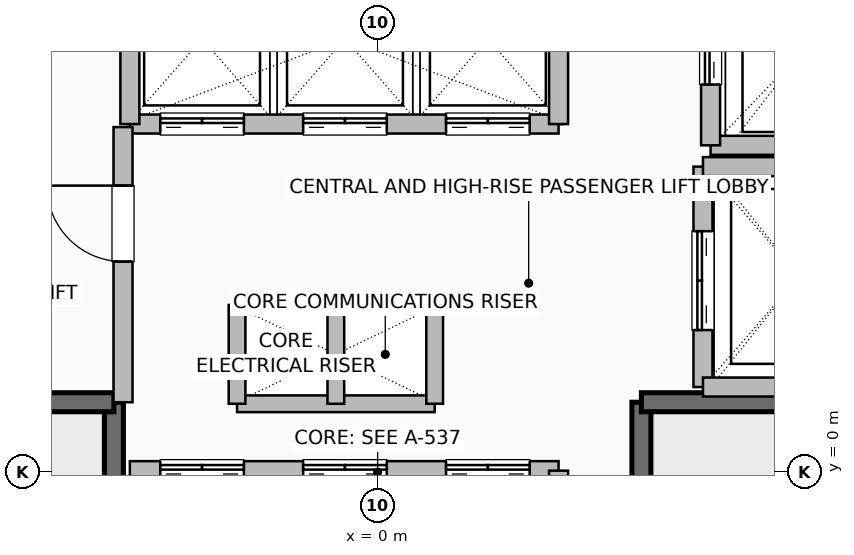
"""IFC4 building model, lengths in metres.
Left out: names, types, materials, properties, quantities, classifications, styles, units other than length and angle.
Written with IfcOpenShell. Run it as: python <this file> out.ifc"""

import sys

from ifc_helpers import new_model, si_unit, direction, frame, frame_2d, origin, place, context, subcontext, project, spatial, rectangle, extrude, element, fill, save


model = new_model("IFC4")
c1 = context("Model", 3, precision=1e-05, world=origin(), true_north=direction((0.0, 1.0)))
c2 = subcontext(c1, "Body", "Model", "MODEL_VIEW")
j1 = project(units=[si_unit("LENGTHUNIT", "METRE"), si_unit("PLANEANGLEUNIT", "RADIAN")], contexts=[c1])
p1 = place(None, origin())
s1 = spatial("IfcSite", under=j1, at=p1, CompositionType="ELEMENT")
p2 = place(p1, origin())
s2 = spatial("IfcBuilding", under=s1, at=p2, CompositionType="ELEMENT")
p3 = place(p2, frame((0.0, 0.0, 140.8)))
s3 = spatial("IfcBuildingStorey", under=s2, at=p3, CompositionType="ELEMENT", Elevation=140.8)
p4 = place(p3, frame((-3.47, -6.8, 0.0), z_axis=(0.0, 0.0, 1.0), x_axis=(0.0, 1.0, 0.0)))
e1 = element("IfcWall", 1, at=p4, inside=s3, PredefinedType="SHEAR", context=c2, shape_type="SweptSolid", body=[
    extrude(rectangle(XDim=7.72, YDim=0.25, at=frame_2d((3.86, 0.0))), origin(), (0.0, 0.0, 1.0), 3.36),
])
p5 = place(p3, frame((-6.8, 0.92, 0.0), z_axis=(0.0, 0.0, 1.0), x_axis=(1.0, 0.0, 0.0)))
e2 = element("IfcWall", 2, at=p5, inside=s3, PredefinedType="SHEAR", context=c2, shape_type="SweptSolid", body=[
    extrude(rectangle(XDim=3.33, YDim=0.25, at=frame_2d((1.665, 0.0))), origin(), (0.0, 0.0, 1.0), 3.36),
])
p6 = place(p3, frame((3.47, -6.8, 0.0), z_axis=(0.0, 0.0, 1.0), x_axis=(0.0, 1.0, 0.0)))
e3 = element("IfcWall", 3, at=p6, inside=s3, PredefinedType="SHEAR", context=c2, shape_type="SweptSolid", body=[
    extrude(rectangle(XDim=7.72, YDim=0.25, at=frame_2d((3.86, 0.0))), origin(), (0.0, 0.0, 1.0), 3.36),
])
p7 = place(p3, frame((3.47, 0.92, 0.0), z_axis=(0.0, 0.0, 1.0), x_axis=(1.0, 0.0, 0.0)))
e4 = element("IfcWall", 4, at=p7, inside=s3, PredefinedType="SHEAR", context=c2, shape_type="SweptSolid", body=[
    extrude(rectangle(XDim=3.33, YDim=0.25, at=frame_2d((1.665, 0.0))), origin(), (0.0, 0.0, 1.0), 3.36),
])
for number, where, z_axis, x_axis in (
    (5, (-1.85, 2.2, 0.0), (0.0, 0.0, 1.0), (1.0, 0.0, 0.0)),
    (6, (-1.85, 0.9, 0.0), (0.0, 0.0, 1.0), (1.0, 0.0, 0.0)),
):
    element("IfcWall", number, at=place(p3, frame(where, z_axis=z_axis, x_axis=x_axis)), inside=s3, PredefinedType="PARTITIONING", context=c2, shape_type="SweptSolid", body=[
        extrude(rectangle(XDim=2.6, YDim=0.22, at=frame_2d((1.3, 0.0))), origin(), (0.0, 0.0, 1.0), 3.36),
    ])
for number, where, z_axis, x_axis in (
    (7, (-0.55, 0.9, 0.0), (0.0, 0.0, 1.0), (0.0, 1.0, 0.0)),
    (8, (0.75, 0.9, 0.0), (0.0, 0.0, 1.0), (0.0, 1.0, 0.0)),
    (9, (-1.85, 0.9, 0.0), (0.0, 0.0, 1.0), (0.0, 1.0, 0.0)),
):
    element("IfcWall", number, at=place(p3, frame(where, z_axis=z_axis, x_axis=x_axis)), inside=s3, PredefinedType="PARTITIONING", context=c2, shape_type="SweptSolid", body=[
        extrude(rectangle(XDim=1.3, YDim=0.22, at=frame_2d((0.65, 0.0))), origin(), (0.0, 0.0, 1.0), 3.36),
    ])
p8 = place(p3, frame((-3.26, 0.02, 0.0), z_axis=(0.0, 0.0, 1.0), x_axis=(1.0, 0.0, 0.0)))
e10 = element("IfcWall", 10, at=p8, inside=s3, PredefinedType="SHEAR", context=c2, shape_type="SweptSolid", body=[
    extrude(rectangle(XDim=5.64, YDim=0.25, at=frame_2d((2.82, 0.0))), origin(), (0.0, 0.0, 1.0), 3.36),
])
p9 = place(p8, frame((0.4, 0.0, 0.0)))
e11 = element("IfcOpeningElement", 11, at=p9, cuts=e10, PredefinedType="OPENING", context=c2, shape_type="SweptSolid", body=[
    extrude(rectangle(XDim=1.1, YDim=2.2, at=frame_2d((0.55, 1.1))), frame((0.0, 0.135, 0.0), z_axis=(0.0, -1.0, 0.0), x_axis=(1.0, 0.0, 0.0)), (0.0, 0.0, 1.0), 0.27),
])
p10 = place(p8, frame((2.28, 0.0, 0.0)))
e12 = element("IfcOpeningElement", 12, at=p10, cuts=e10, PredefinedType="OPENING", context=c2, shape_type="SweptSolid", body=[
    extrude(rectangle(XDim=1.1, YDim=2.2, at=frame_2d((0.55, 1.1))), frame((0.0, 0.135, 0.0), z_axis=(0.0, -1.0, 0.0), x_axis=(1.0, 0.0, 0.0)), (0.0, 0.0, 1.0), 0.27),
])
p11 = place(p8, frame((4.16, 0.0, 0.0)))
e13 = element("IfcOpeningElement", 13, at=p11, cuts=e10, PredefinedType="OPENING", context=c2, shape_type="SweptSolid", body=[
    extrude(rectangle(XDim=1.1, YDim=2.2, at=frame_2d((0.55, 1.1))), frame((0.0, 0.135, 0.0), z_axis=(0.0, -1.0, 0.0), x_axis=(1.0, 0.0, 0.0)), (0.0, 0.0, 1.0), 0.27),
])
p12 = place(p3, frame((2.38, -2.42, 0.0), z_axis=(0.0, 0.0, 1.0), x_axis=(0.0, 1.0, 0.0)))
e14 = element("IfcWall", 14, at=p12, inside=s3, PredefinedType="SHEAR", context=c2, shape_type="SweptSolid", body=[
    extrude(rectangle(XDim=2.44, YDim=0.25, at=frame_2d((1.22, 0.0))), origin(), (0.0, 0.0, 1.0), 3.36),
])
p13 = place(p3, frame((-3.26, 4.58, 0.0), z_axis=(0.0, 0.0, 1.0), x_axis=(1.0, 0.0, 0.0)))
e15 = element("IfcWall", 15, at=p13, inside=s3, PredefinedType="SHEAR", context=c2, shape_type="SweptSolid", body=[
    extrude(rectangle(XDim=5.64, YDim=0.25, at=frame_2d((2.82, 0.0))), origin(), (0.0, 0.0, 1.0), 3.36),
])
p14 = place(p13, frame((0.4, 0.0, 0.0)))
e16 = element("IfcOpeningElement", 16, at=p14, cuts=e15, PredefinedType="OPENING", context=c2, shape_type="SweptSolid", body=[
    extrude(rectangle(XDim=1.1, YDim=2.2, at=frame_2d((0.55, 1.1))), frame((0.0, 0.135, 0.0), z_axis=(0.0, -1.0, 0.0), x_axis=(1.0, 0.0, 0.0)), (0.0, 0.0, 1.0), 0.27),
])
p15 = place(p13, frame((2.28, 0.0, 0.0)))
e17 = element("IfcOpeningElement", 17, at=p15, cuts=e15, PredefinedType="OPENING", context=c2, shape_type="SweptSolid", body=[
    extrude(rectangle(XDim=1.1, YDim=2.2, at=frame_2d((0.55, 1.1))), frame((0.0, 0.135, 0.0), z_axis=(0.0, -1.0, 0.0), x_axis=(1.0, 0.0, 0.0)), (0.0, 0.0, 1.0), 0.27),
])
p16 = place(p13, frame((4.16, 0.0, 0.0)))
e18 = element("IfcOpeningElement", 18, at=p16, cuts=e15, PredefinedType="OPENING", context=c2, shape_type="SweptSolid", body=[
    extrude(rectangle(XDim=1.1, YDim=2.2, at=frame_2d((0.55, 1.1))), frame((0.0, 0.135, 0.0), z_axis=(0.0, -1.0, 0.0), x_axis=(1.0, 0.0, 0.0)), (0.0, 0.0, 1.0), 0.27),
])
for number, where, z_axis, x_axis in (
    (19, (-3.26, 4.58, 0.0), (0.0, 0.0, 1.0), (0.0, 1.0, 0.0)),
    (20, (2.38, 4.58, 0.0), (0.0, 0.0, 1.0), (0.0, 1.0, 0.0)),
):
    element("IfcWall", number, at=place(p3, frame(where, z_axis=z_axis, x_axis=x_axis)), inside=s3, PredefinedType="SHEAR", context=c2, shape_type="SweptSolid", body=[
        extrude(rectangle(XDim=2.22, YDim=0.25, at=frame_2d((1.11, 0.0))), origin(), (0.0, 0.0, 1.0), 3.36),
    ])
p17 = place(p3, frame((4.38, 4.3, 0.0), z_axis=(0.0, 0.0, 1.0), x_axis=(1.0, 0.0, 0.0)))
e21 = element("IfcWall", 21, at=p17, inside=s3, PredefinedType="SHEAR", context=c2, shape_type="SweptSolid", body=[
    extrude(rectangle(XDim=2.42, YDim=0.25, at=frame_2d((1.21, 0.0))), origin(), (0.0, 0.0, 1.0), 3.36),
])
p18 = place(p3, frame((4.38, 4.3, 0.0), z_axis=(0.0, 0.0, 1.0), x_axis=(0.0, 1.0, 0.0)))
e22 = element("IfcWall", 22, at=p18, inside=s3, PredefinedType="SHEAR", context=c2, shape_type="SweptSolid", body=[
    extrude(rectangle(XDim=2.5, YDim=0.25, at=frame_2d((1.25, 0.0))), origin(), (0.0, 0.0, 1.0), 3.36),
])
p19 = place(p18, frame((0.8, 0.0, 0.0)))
e23 = element("IfcOpeningElement", 23, at=p19, cuts=e22, PredefinedType="OPENING", context=c2, shape_type="SweptSolid", body=[
    extrude(rectangle(XDim=1.2, YDim=2.2, at=frame_2d((0.6, 1.1))), frame((0.0, 0.135, 0.0), z_axis=(0.0, -1.0, 0.0), x_axis=(1.0, 0.0, 0.0)), (0.0, 0.0, 1.0), 0.27),
])
p20 = place(p3, frame((4.28, 1.12, 0.0), z_axis=(0.0, 0.0, 1.0), x_axis=(0.0, 1.0, 0.0)))
e24 = element("IfcWall", 24, at=p20, inside=s3, PredefinedType="SHEAR", context=c2, shape_type="SweptSolid", body=[
    extrude(rectangle(XDim=2.9, YDim=0.25, at=frame_2d((1.45, 0.0))), origin(), (0.0, 0.0, 1.0), 3.36),
])
p21 = place(p20, frame((0.75, 0.0, 0.0)))
e25 = element("IfcOpeningElement", 25, at=p21, cuts=e24, PredefinedType="OPENING", context=c2, shape_type="SweptSolid", body=[
    extrude(rectangle(XDim=1.3, YDim=2.3, at=frame_2d((0.65, 1.15))), frame((0.0, 0.135, 0.0), z_axis=(0.0, -1.0, 0.0), x_axis=(1.0, 0.0, 0.0)), (0.0, 0.0, 1.0), 0.27),
])
for number, where, z_axis, x_axis in (
    (26, (4.28, 1.12, 0.0), (0.0, 0.0, 1.0), (1.0, 0.0, 0.0)),
    (27, (4.28, 4.02, 0.0), (0.0, 0.0, 1.0), (1.0, 0.0, 0.0)),
):
    element("IfcWall", number, at=place(p3, frame(where, z_axis=z_axis, x_axis=x_axis)), inside=s3, PredefinedType="SHEAR", context=c2, shape_type="SweptSolid", body=[
        extrude(rectangle(XDim=2.52, YDim=0.25, at=frame_2d((1.26, 0.0))), origin(), (0.0, 0.0, 1.0), 3.36),
    ])
p22 = place(p3, frame((-3.35, 0.92, 0.0), z_axis=(0.0, 0.0, 1.0), x_axis=(0.0, 1.0, 0.0)))
e28 = element("IfcWall", 28, at=p22, inside=s3, PredefinedType="SHEAR", context=c2, shape_type="SweptSolid", body=[
    extrude(rectangle(XDim=3.62, YDim=0.25, at=frame_2d((1.81, 0.0))), origin(), (0.0, 0.0, 1.0), 3.36),
])
p23 = place(p22, frame((1.85, 0.0, 0.0)))
e29 = element("IfcOpeningElement", 29, at=p23, cuts=e28, PredefinedType="OPENING", context=c2, shape_type="SweptSolid", body=[
    extrude(rectangle(XDim=1.0, YDim=2.08, at=frame_2d((0.5, 1.04))), frame((0.0, 0.135, 0.0), z_axis=(0.0, -1.0, 0.0), x_axis=(1.0, 0.0, 0.0)), (0.0, 0.0, 1.0), 0.27),
])
p24 = place(p9, origin())
e30 = element("IfcDoor", 30, at=p24, inside=s3, OperationType="DOUBLE_DOOR_SLIDING", PredefinedType="DOOR", context=c2, shape_type="SweptSolid", body=[
    extrude(rectangle(XDim=1.1, YDim=2.2, at=frame_2d((0.55, 1.1))), frame((0.0, 0.025, 0.0), z_axis=(0.0, -1.0, 0.0), x_axis=(1.0, 0.0, 0.0)), (0.0, 0.0, 1.0), 0.05),
])
fill(e11, e30)
p25 = place(p10, origin())
e31 = element("IfcDoor", 31, at=p25, inside=s3, OperationType="DOUBLE_DOOR_SLIDING", PredefinedType="DOOR", context=c2, shape_type="SweptSolid", body=[
    extrude(rectangle(XDim=1.1, YDim=2.2, at=frame_2d((0.55, 1.1))), frame((0.0, 0.025, 0.0), z_axis=(0.0, -1.0, 0.0), x_axis=(1.0, 0.0, 0.0)), (0.0, 0.0, 1.0), 0.05),
])
fill(e12, e31)
p26 = place(p11, origin())
e32 = element("IfcDoor", 32, at=p26, inside=s3, OperationType="DOUBLE_DOOR_SLIDING", PredefinedType="DOOR", context=c2, shape_type="SweptSolid", body=[
    extrude(rectangle(XDim=1.1, YDim=2.2, at=frame_2d((0.55, 1.1))), frame((0.0, 0.025, 0.0), z_axis=(0.0, -1.0, 0.0), x_axis=(1.0, 0.0, 0.0)), (0.0, 0.0, 1.0), 0.05),
])
fill(e13, e32)
p27 = place(p14, origin())
e33 = element("IfcDoor", 33, at=p27, inside=s3, OperationType="DOUBLE_DOOR_SLIDING", PredefinedType="DOOR", context=c2, shape_type="SweptSolid", body=[
    extrude(rectangle(XDim=1.1, YDim=2.2, at=frame_2d((0.55, 1.1))), frame((0.0, 0.025, 0.0), z_axis=(0.0, -1.0, 0.0), x_axis=(1.0, 0.0, 0.0)), (0.0, 0.0, 1.0), 0.05),
])
fill(e16, e33)
p28 = place(p15, origin())
e34 = element("IfcDoor", 34, at=p28, inside=s3, OperationType="DOUBLE_DOOR_SLIDING", PredefinedType="DOOR", context=c2, shape_type="SweptSolid", body=[
    extrude(rectangle(XDim=1.1, YDim=2.2, at=frame_2d((0.55, 1.1))), frame((0.0, 0.025, 0.0), z_axis=(0.0, -1.0, 0.0), x_axis=(1.0, 0.0, 0.0)), (0.0, 0.0, 1.0), 0.05),
])
fill(e17, e34)
p29 = place(p16, origin())
e35 = element("IfcDoor", 35, at=p29, inside=s3, OperationType="DOUBLE_DOOR_SLIDING", PredefinedType="DOOR", context=c2, shape_type="SweptSolid", body=[
    extrude(rectangle(XDim=1.1, YDim=2.2, at=frame_2d((0.55, 1.1))), frame((0.0, 0.025, 0.0), z_axis=(0.0, -1.0, 0.0), x_axis=(1.0, 0.0, 0.0)), (0.0, 0.0, 1.0), 0.05),
])
fill(e18, e35)
p30 = place(p19, origin())
e36 = element("IfcDoor", 36, at=p30, inside=s3, OperationType="DOUBLE_DOOR_SLIDING", PredefinedType="DOOR", context=c2, shape_type="SweptSolid", body=[
    extrude(rectangle(XDim=1.2, YDim=2.2, at=frame_2d((0.6, 1.1))), frame((0.0, 0.025, 0.0), z_axis=(0.0, -1.0, 0.0), x_axis=(1.0, 0.0, 0.0)), (0.0, 0.0, 1.0), 0.05),
])
fill(e23, e36)
p31 = place(p21, origin())
e37 = element("IfcDoor", 37, at=p31, inside=s3, OperationType="DOUBLE_DOOR_SLIDING", PredefinedType="DOOR", context=c2, shape_type="SweptSolid", body=[
    extrude(rectangle(XDim=1.3, YDim=2.3, at=frame_2d((0.65, 1.15))), frame((0.0, 0.025, 0.0), z_axis=(0.0, -1.0, 0.0), x_axis=(1.0, 0.0, 0.0)), (0.0, 0.0, 1.0), 0.05),
])
fill(e25, e37)
p32 = place(p23, origin())
e38 = element("IfcDoor", 38, at=p32, inside=s3, OperationType="SINGLE_SWING_RIGHT", PredefinedType="DOOR", context=c2, shape_type="SweptSolid", body=[
    extrude(rectangle(XDim=1.0, YDim=2.08, at=frame_2d((0.5, 1.04))), frame((0.0, 0.025, 0.0), z_axis=(0.0, -1.0, 0.0), x_axis=(1.0, 0.0, 0.0)), (0.0, 0.0, 1.0), 0.05),
])
fill(e29, e38)
save(model, sys.argv[1])
